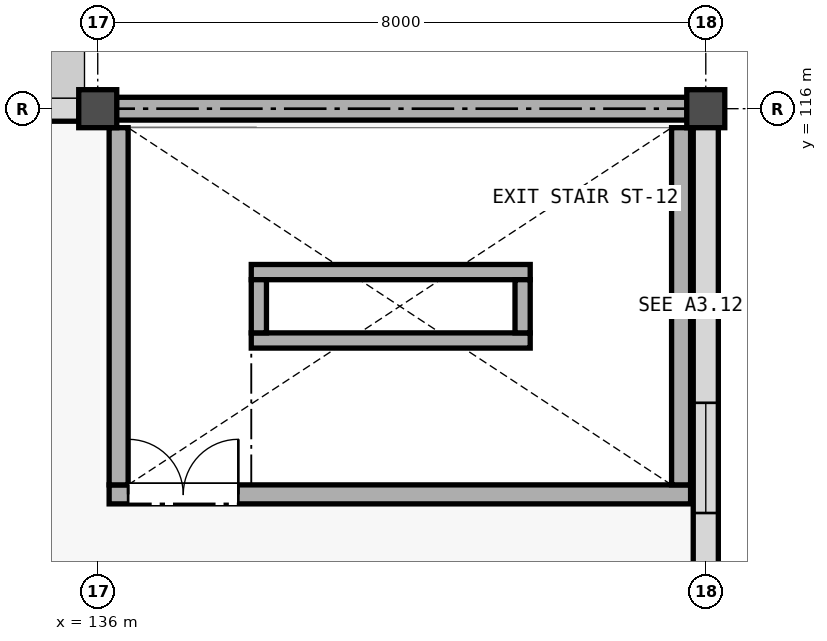
"""IFC4 building model, lengths in metres.
Left out: names, types, materials, properties, quantities, classifications, styles, units other than length and angle.
Written with IfcOpenShell. Run it as: python <this file> out.ifc"""

import sys

from ifc_helpers import new_model, si_unit, direction, frame, frame_2d, origin, origin_2d, place, context, subcontext, project, spatial, rectangle, extrude, element, fill, save


model = new_model("IFC4")
c1 = context("Model", 3, precision=1e-05, world=origin(), true_north=direction((0.0, 1.0)))
c2 = subcontext(c1, "Body", "Model", "MODEL_VIEW")
j1 = project(units=[si_unit("LENGTHUNIT", "METRE"), si_unit("PLANEANGLEUNIT", "RADIAN")], contexts=[c1])
p1 = place(None, origin())
s1 = spatial("IfcSite", under=j1, at=p1, CompositionType="ELEMENT")
p2 = place(p1, origin())
s2 = spatial("IfcBuilding", under=s1, at=p2, CompositionType="ELEMENT")
p3 = place(p2, frame((0.0, 0.0, 5.4)))
s3 = spatial("IfcBuildingStorey", under=s2, at=p3, CompositionType="ELEMENT", Elevation=5.4)
for number, where, z_axis, x_axis in (
    (1, (136.0, 116.0, 0.0), (0.0, 0.0, 1.0), (1.0, 0.0, 0.0)),
    (2, (144.0, 116.0, 0.0), (0.0, 0.0, 1.0), (1.0, 0.0, 0.0)),
):
    element("IfcColumn", number, at=place(p3, frame(where, z_axis=z_axis, x_axis=x_axis)), inside=s3, PredefinedType="COLUMN", context=c2, shape_type="SweptSolid", body=[
        extrude(rectangle(XDim=0.5, YDim=0.5, at=origin_2d()), origin(), (0.0, 0.0, 1.0), 4.55),
    ])
p4 = place(p3, frame((128.246, 116.0, 0.0), z_axis=(0.0, 0.0, 1.0), x_axis=(1.0, 0.0, 0.0)))
e3 = element("IfcWall", 3, at=p4, inside=s3, PredefinedType="STANDARD", context=c2, shape_type="SweptSolid", body=[
    extrude(rectangle(XDim=7.508, YDim=0.33, at=frame_2d((3.754, 0.0))), origin(), (0.0, 0.0, 1.0), 3.7),
])
p5 = place(p4, frame((1.134, 0.0, 1.45)))
e4 = element("IfcOpeningElement", 4, at=p5, cuts=e3, PredefinedType="OPENING", context=c2, shape_type="SweptSolid", body=[
    extrude(rectangle(XDim=2.1, YDim=1.5, at=frame_2d((1.05, 0.75))), frame((0.0, 0.175, 0.0), z_axis=(0.0, -1.0, 0.0), x_axis=(1.0, 0.0, 0.0)), (0.0, 0.0, 1.0), 0.35),
])
p6 = place(p4, frame((4.334, 0.0, 1.45)))
e5 = element("IfcOpeningElement", 5, at=p6, cuts=e3, PredefinedType="OPENING", context=c2, shape_type="SweptSolid", body=[
    extrude(rectangle(XDim=2.2, YDim=1.6, at=frame_2d((1.1, 0.8))), frame((0.0, 0.175, 0.0), z_axis=(0.0, -1.0, 0.0), x_axis=(1.0, 0.0, 0.0)), (0.0, 0.0, 1.0), 0.35),
])
p7 = place(p3, frame((136.246, 116.0, 0.0), z_axis=(0.0, 0.0, 1.0), x_axis=(1.0, 0.0, 0.0)))
e6 = element("IfcWall", 6, at=p7, inside=s3, PredefinedType="SHEAR", context=c2, shape_type="SweptSolid", body=[
    extrude(rectangle(XDim=7.508, YDim=0.3, at=frame_2d((3.754, 0.0))), origin(), (0.0, 0.0, 1.0), 4.8),
])
p8 = place(p3, frame((144.0, 108.246, 0.0), z_axis=(0.0, 0.0, 1.0), x_axis=(0.0, 1.0, 0.0)))
e7 = element("IfcWall", 7, at=p8, inside=s3, PredefinedType="STANDARD", context=c2, shape_type="SweptSolid", body=[
    extrude(rectangle(XDim=7.508, YDim=0.33, at=frame_2d((3.754, 0.0))), origin(), (0.0, 0.0, 1.0), 3.85),
])
p9 = place(p8, frame((2.434, 0.0, 1.45)))
e8 = element("IfcOpeningElement", 8, at=p9, cuts=e7, PredefinedType="OPENING", context=c2, shape_type="SweptSolid", body=[
    extrude(rectangle(XDim=1.45, YDim=1.5, at=frame_2d((0.725, 0.75))), frame((0.0, 0.175, 0.0), z_axis=(0.0, -1.0, 0.0), x_axis=(1.0, 0.0, 0.0)), (0.0, 0.0, 1.0), 0.35),
])
p10 = place(p3, frame((136.15, 110.925, 0.0), z_axis=(0.0, 0.0, 1.0), x_axis=(1.0, 0.0, 0.0)))
e9 = element("IfcWall", 9, at=p10, inside=s3, PredefinedType="SHEAR", context=c2, shape_type="SweptSolid", body=[
    extrude(rectangle(XDim=7.65, YDim=0.25, at=frame_2d((3.825, 0.0))), origin(), (0.0, 0.0, 1.0), 4.55),
])
p11 = place(p10, frame((0.25, 0.0, 0.0)))
e10 = element("IfcOpeningElement", 10, at=p11, cuts=e9, PredefinedType="OPENING", context=c2, shape_type="SweptSolid", body=[
    extrude(rectangle(XDim=1.45, YDim=2.2, at=frame_2d((0.725, 1.1))), frame((0.0, 0.135, 0.0), z_axis=(0.0, -1.0, 0.0), x_axis=(1.0, 0.0, 0.0)), (0.0, 0.0, 1.0), 0.27),
])
for number, where, z_axis, x_axis in (
    (11, (136.275, 111.05, 0.0), (0.0, 0.0, 1.0), (0.0, 1.0, 0.0)),
    (12, (143.675, 111.05, 0.0), (0.0, 0.0, 1.0), (0.0, 1.0, 0.0)),
):
    element("IfcWall", number, at=place(p3, frame(where, z_axis=z_axis, x_axis=x_axis)), inside=s3, PredefinedType="SHEAR", context=c2, shape_type="SweptSolid", body=[
        extrude(rectangle(XDim=4.7, YDim=0.25, at=frame_2d((2.35, 0.0))), origin(), (0.0, 0.0, 1.0), 4.55),
    ])
for number, where, z_axis, x_axis in (
    (13, (138.02, 112.95, 0.0), (0.0, 0.0, 1.0), (1.0, 0.0, 0.0)),
    (14, (138.02, 113.85, 0.0), (0.0, 0.0, 1.0), (1.0, 0.0, 0.0)),
):
    element("IfcWall", number, at=place(p3, frame(where, z_axis=z_axis, x_axis=x_axis)), inside=s3, PredefinedType="SHEAR", context=c2, shape_type="SweptSolid", body=[
        extrude(rectangle(XDim=3.67, YDim=0.2, at=frame_2d((1.835, 0.0))), origin(), (0.0, 0.0, 1.0), 4.55),
    ])
for number, where, z_axis, x_axis in (
    (15, (138.12, 113.05, 0.0), (0.0, 0.0, 1.0), (0.0, 1.0, 0.0)),
    (16, (141.59, 113.05, 0.0), (0.0, 0.0, 1.0), (0.0, 1.0, 0.0)),
):
    element("IfcWall", number, at=place(p3, frame(where, z_axis=z_axis, x_axis=x_axis)), inside=s3, PredefinedType="SHEAR", context=c2, shape_type="SweptSolid", body=[
        extrude(rectangle(XDim=0.7, YDim=0.2, at=frame_2d((0.35, 0.0))), origin(), (0.0, 0.0, 1.0), 4.55),
    ])
p12 = place(p9, origin())
e17 = element("IfcWindow", 17, at=p12, inside=s3, PartitioningType="SINGLE_PANEL", PredefinedType="WINDOW", context=c2, shape_type="SweptSolid", body=[
    extrude(rectangle(XDim=1.45, YDim=1.5, at=frame_2d((0.725, 0.75))), frame((0.0, 0.03, 0.0), z_axis=(0.0, -1.0, 0.0), x_axis=(1.0, 0.0, 0.0)), (0.0, 0.0, 1.0), 0.06),
])
fill(e8, e17)
p13 = place(p11, origin())
e18 = element("IfcDoor", 18, at=p13, inside=s3, OperationType="DOUBLE_DOOR_SINGLE_SWING", PredefinedType="DOOR", context=c2, shape_type="SweptSolid", body=[
    extrude(rectangle(XDim=1.45, YDim=2.2, at=frame_2d((0.725, 1.1))), frame((0.0, 0.025, 0.0), z_axis=(0.0, -1.0, 0.0), x_axis=(1.0, 0.0, 0.0)), (0.0, 0.0, 1.0), 0.05),
])
fill(e10, e18)
save(model, sys.argv[1])
